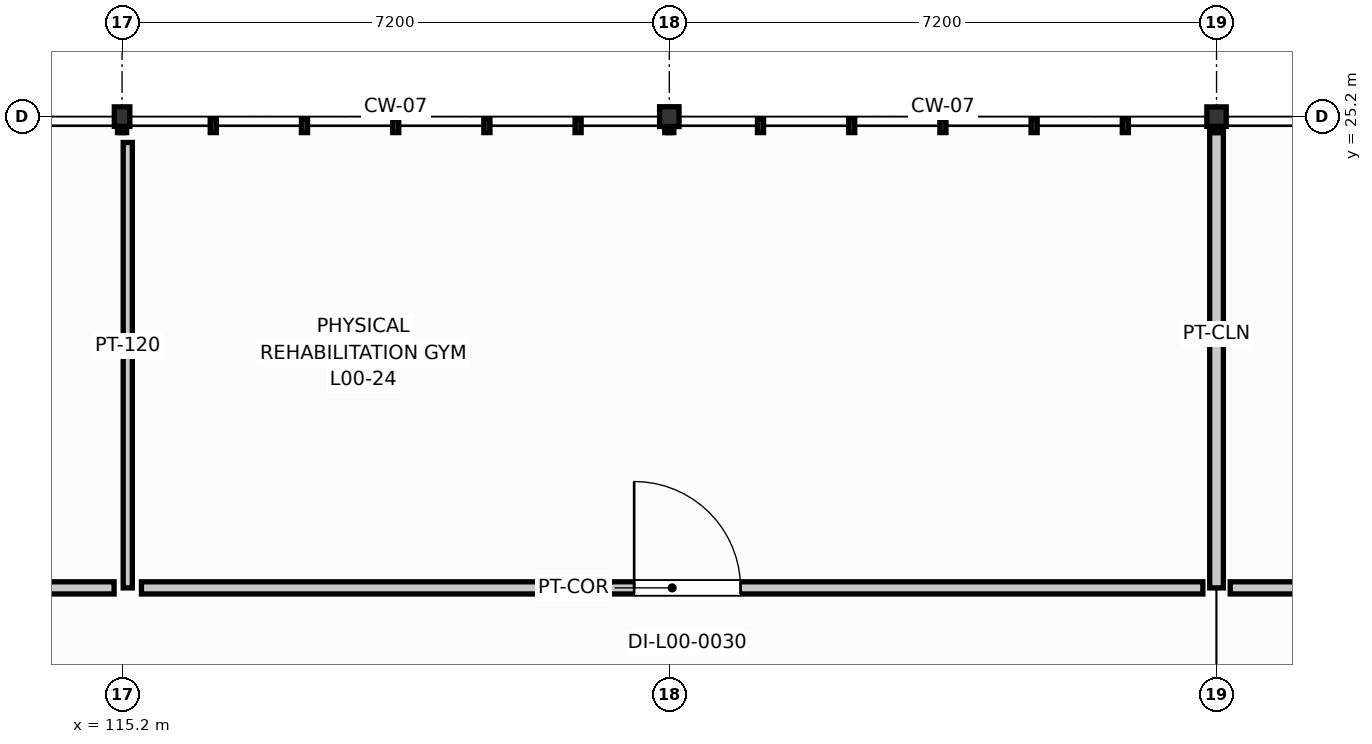
"""IFC4 building model, lengths in metres.
Left out: names, types, materials, properties, quantities, classifications, styles, units other than length and angle.
Written with IfcOpenShell. Run it as: python <this file> out.ifc"""

import sys

from ifc_helpers import new_model, si_unit, direction, frame, frame_2d, origin, origin_2d, place, context, subcontext, project, spatial, rectangle, i_section, extrude, element, fill, save


model = new_model("IFC4")
c1 = context("Model", 3, precision=1e-05, world=origin(), true_north=direction((0.0, 1.0)))
c2 = subcontext(c1, "Body", "Model", "MODEL_VIEW")
j1 = project(units=[si_unit("LENGTHUNIT", "METRE"), si_unit("PLANEANGLEUNIT", "RADIAN")], contexts=[c1])
p1 = place(None, origin())
s1 = spatial("IfcSite", under=j1, at=p1, CompositionType="ELEMENT")
p2 = place(p1, origin())
s2 = spatial("IfcBuilding", under=s1, at=p2, CompositionType="ELEMENT")
p3 = place(p2, origin())
s3 = spatial("IfcBuildingStorey", under=s2, at=p3, CompositionType="ELEMENT", Elevation=0.0)
p4 = place(p3, frame((115.2, 25.2, 0.0), z_axis=(0.0, 0.0, 1.0), x_axis=(1.0, 0.0, 0.0)))
e1 = element("IfcColumn", 1, at=p4, inside=s3, PredefinedType="COLUMN", context=c2, shape_type="SweptSolid", body=[
    extrude(i_section(OverallWidth=0.204, OverallDepth=0.257, WebThickness=0.009, FlangeThickness=0.016, FilletRadius=0.013, at=origin_2d()), origin(), (0.0, 0.0, 1.0), 4.8),
])
p5 = place(p3, frame((122.4, 25.2, 0.0), z_axis=(0.0, 0.0, 1.0), x_axis=(1.0, 0.0, 0.0)))
e2 = element("IfcColumn", 2, at=p5, inside=s3, PredefinedType="COLUMN", context=c2, shape_type="SweptSolid", body=[
    extrude(i_section(OverallWidth=0.256, OverallDepth=0.26, WebThickness=0.011, FlangeThickness=0.017, FilletRadius=0.013, at=origin_2d()), origin(), (0.0, 0.0, 1.0), 4.8),
])
p6 = place(p3, frame((129.6, 25.2, 0.0), z_axis=(0.0, 0.0, 1.0), x_axis=(1.0, 0.0, 0.0)))
e3 = element("IfcColumn", 3, at=p6, inside=s3, PredefinedType="COLUMN", context=c2, shape_type="SweptSolid", body=[
    extrude(i_section(OverallWidth=0.255, OverallDepth=0.256, WebThickness=0.01, FlangeThickness=0.016, FilletRadius=0.013, at=origin_2d()), origin(), (0.0, 0.0, 1.0), 4.8),
])
p7 = place(p3, frame((115.275, 24.86, 0.0), z_axis=(0.0, 0.0, 1.0), x_axis=(0.0, -1.0, 0.0)))
e4 = element("IfcWall", 4, at=p7, inside=s3, PredefinedType="PARTITIONING", context=c2, shape_type="SweptSolid", body=[
    extrude(rectangle(XDim=5.86, YDim=0.12, at=frame_2d((2.93, 0.0))), origin(), (0.0, 0.0, 1.0), 4.085),
])
p8 = place(p3, frame((115.095, 19.0, 0.0), z_axis=(0.0, 0.0, 1.0), x_axis=(-1.0, 0.0, 0.0)))
e5 = element("IfcWall", 5, at=p8, inside=s3, PredefinedType="PARTITIONING", context=c2, shape_type="SweptSolid", body=[
    extrude(rectangle(XDim=13.955, YDim=0.16, at=frame_2d((6.978, 0.0))), origin(), (0.0, 0.0, 1.0), 4.008),
])
p9 = place(p8, frame((6.302, 0.0, 0.0)))
e6 = element("IfcOpeningElement", 6, at=p9, cuts=e5, PredefinedType="OPENING", context=c2, shape_type="SweptSolid", body=[
    extrude(rectangle(XDim=1.35, YDim=2.15, at=frame_2d((0.675, 1.075))), frame((0.0, 0.09, 0.0), z_axis=(0.0, -1.0, 0.0), x_axis=(1.0, 0.0, 0.0)), (0.0, 0.0, 1.0), 0.18),
])
p10 = place(p3, frame((129.6, 25.19, 0.0), z_axis=(0.0, 0.0, 1.0), x_axis=(0.0, -1.0, 0.0)))
e7 = element("IfcWall", 7, at=p10, inside=s3, PredefinedType="PARTITIONING", context=c2, shape_type="SweptSolid", body=[
    extrude(rectangle(XDim=6.19, YDim=0.18, at=frame_2d((3.095, 0.0))), origin(), (0.0, 0.0, 1.0), 3.775),
])
p11 = place(p3, frame((129.42, 19.0, 0.0), z_axis=(0.0, 0.0, 1.0), x_axis=(-1.0, 0.0, 0.0)))
e8 = element("IfcWall", 8, at=p11, inside=s3, PredefinedType="PARTITIONING", context=c2, shape_type="SweptSolid", body=[
    extrude(rectangle(XDim=13.965, YDim=0.16, at=frame_2d((6.982, 0.0))), origin(), (0.0, 0.0, 1.0), 3.775),
])
p12 = place(p11, frame((6.083, 0.0, 0.0)))
e9 = element("IfcOpeningElement", 9, at=p12, cuts=e8, PredefinedType="OPENING", context=c2, shape_type="SweptSolid", body=[
    extrude(rectangle(XDim=1.4, YDim=2.2, at=frame_2d((0.7, 1.1))), frame((0.0, 0.09, 0.0), z_axis=(0.0, -1.0, 0.0), x_axis=(1.0, 0.0, 0.0)), (0.0, 0.0, 1.0), 0.18),
])
p13 = place(p3, frame((143.745, 19.0, 0.0), z_axis=(0.0, 0.0, 1.0), x_axis=(-1.0, 0.0, 0.0)))
e10 = element("IfcWall", 10, at=p13, inside=s3, PredefinedType="PARTITIONING", context=c2, shape_type="SweptSolid", body=[
    extrude(rectangle(XDim=13.965, YDim=0.16, at=frame_2d((6.982, 0.0))), origin(), (0.0, 0.0, 1.0), 3.775),
])
p14 = place(p13, frame((6.333, 0.0, 0.0)))
e11 = element("IfcOpeningElement", 11, at=p14, cuts=e10, PredefinedType="OPENING", context=c2, shape_type="SweptSolid", body=[
    extrude(rectangle(XDim=0.9, YDim=2.04, at=frame_2d((0.45, 1.02))), frame((0.0, 0.09, 0.0), z_axis=(0.0, -1.0, 0.0), x_axis=(1.0, 0.0, 0.0)), (0.0, 0.0, 1.0), 0.18),
])
p15 = place(p12, frame((1.4, 0.0, 0.0), z_axis=(0.0, 0.0, 1.0), x_axis=(-1.0, 0.0, 0.0)))
e12 = element("IfcDoor", 12, at=p15, inside=s3, OperationType="SINGLE_SWING_LEFT", PredefinedType="DOOR", context=c2, shape_type="SweptSolid", body=[
    extrude(rectangle(XDim=1.4, YDim=2.2, at=frame_2d((0.7, 1.1))), frame((0.0, 0.025, 0.0), z_axis=(0.0, -1.0, 0.0), x_axis=(1.0, 0.0, 0.0)), (0.0, 0.0, 1.0), 0.05),
])
fill(e9, e12)
save(model, sys.argv[1])
